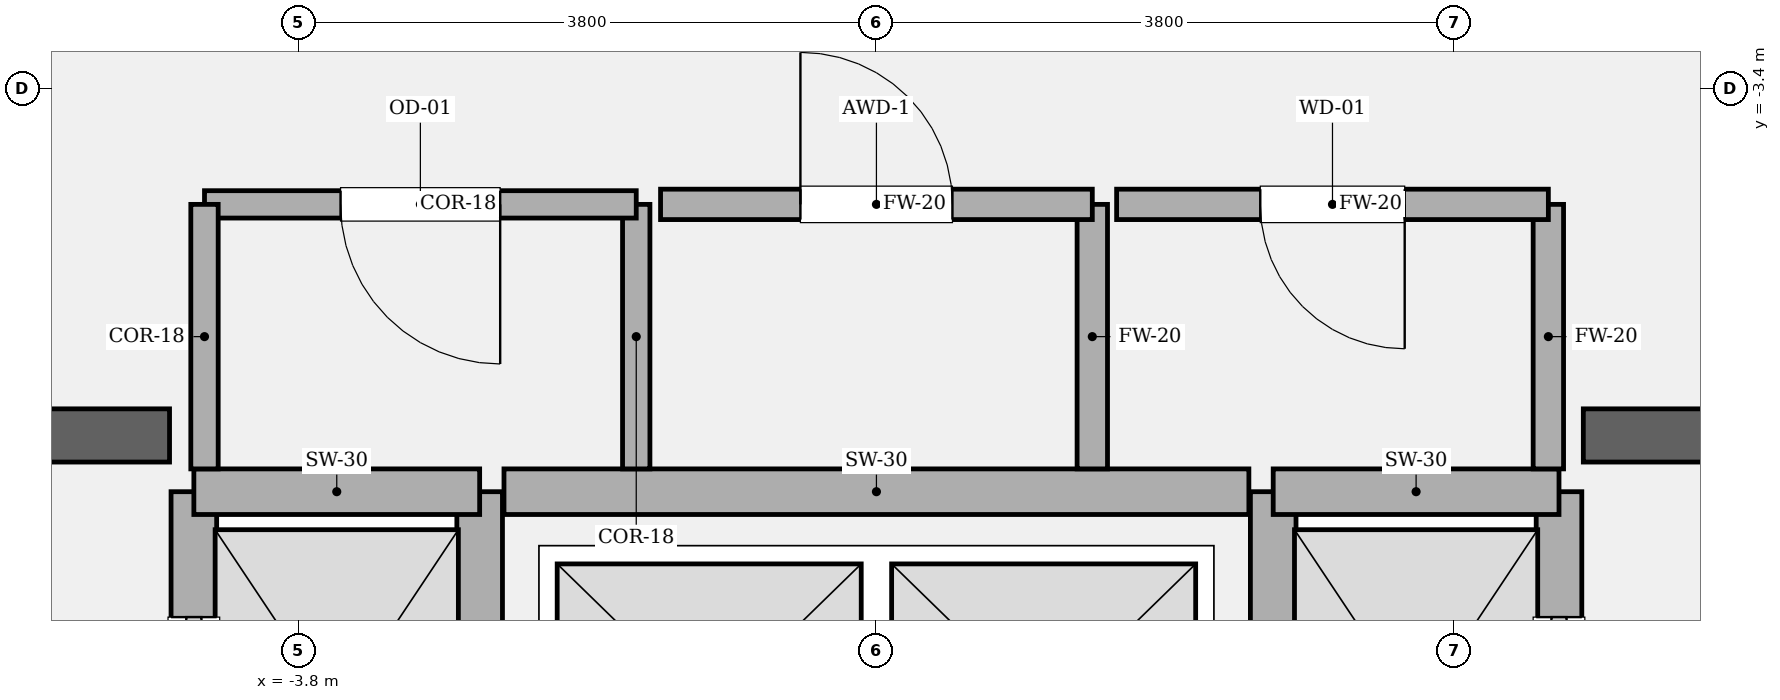
"""IFC4 building model, lengths in metres.
Left out: names, types, materials, properties, quantities, classifications, styles, units other than length and angle.
Written with IfcOpenShell. Run it as: python <this file> out.ifc"""

import sys

from ifc_helpers import new_model, si_unit, direction, frame, frame_2d, origin, place, context, subcontext, project, spatial, rectangle, extrude, element, fill, save


model = new_model("IFC4")
c1 = context("Model", 3, precision=1e-05, world=origin(), true_north=direction((0.0, 1.0)))
c2 = subcontext(c1, "Body", "Model", "MODEL_VIEW")
j1 = project(units=[si_unit("LENGTHUNIT", "METRE"), si_unit("PLANEANGLEUNIT", "RADIAN")], contexts=[c1])
p1 = place(None, origin())
s1 = spatial("IfcSite", under=j1, at=p1, CompositionType="ELEMENT")
p2 = place(p1, origin())
s2 = spatial("IfcBuilding", under=s1, at=p2, CompositionType="ELEMENT")
p3 = place(p2, frame((0.0, 0.0, 334.2)))
s3 = spatial("IfcBuildingStorey", under=s2, at=p3, CompositionType="ELEMENT", Elevation=334.2)
p4 = place(p3, frame((-9.975, -5.68, 0.0), z_axis=(0.0, 0.0, 1.0), x_axis=(1.0, 0.0, 0.0)))
e1 = element("IfcWall", 1, at=p4, inside=s3, PredefinedType="SOLIDWALL", context=c2, shape_type="SweptSolid", body=[
    extrude(rectangle(XDim=5.325, YDim=0.35, at=frame_2d((2.663, 0.0))), origin(), (0.0, 0.0, 1.0), 4.8),
])
p5 = place(p4, frame((1.435, 0.0, 0.0)))
e2 = element("IfcOpeningElement", 2, at=p5, cuts=e1, PredefinedType="OPENING", context=c2, shape_type="SweptSolid", body=[
    extrude(rectangle(XDim=1.18, YDim=2.2, at=frame_2d((0.59, 1.1))), frame((0.0, 0.185, 0.0), z_axis=(0.0, -1.0, 0.0), x_axis=(1.0, 0.0, 0.0)), (0.0, 0.0, 1.0), 0.37),
])
p6 = place(p3, frame((4.65, -5.68, 0.0), z_axis=(0.0, 0.0, 1.0), x_axis=(1.0, 0.0, 0.0)))
e3 = element("IfcWall", 3, at=p6, inside=s3, PredefinedType="SOLIDWALL", context=c2, shape_type="SweptSolid", body=[
    extrude(rectangle(XDim=5.325, YDim=0.35, at=frame_2d((2.663, 0.0))), origin(), (0.0, 0.0, 1.0), 4.8),
])
p7 = place(p6, frame((2.71, 0.0, 0.0)))
e4 = element("IfcOpeningElement", 4, at=p7, cuts=e3, PredefinedType="OPENING", context=c2, shape_type="SweptSolid", body=[
    extrude(rectangle(XDim=1.18, YDim=2.2, at=frame_2d((0.59, 1.1))), frame((0.0, 0.185, 0.0), z_axis=(0.0, -1.0, 0.0), x_axis=(1.0, 0.0, 0.0)), (0.0, 0.0, 1.0), 0.37),
])
p8 = place(p3, frame((-4.49, -8.82, 0.0), z_axis=(0.0, 0.0, 1.0), x_axis=(0.0, 1.0, 0.0)))
e5 = element("IfcWall", 5, at=p8, inside=s3, PredefinedType="SOLIDWALL", context=c2, shape_type="SweptSolid", body=[
    extrude(rectangle(XDim=2.77, YDim=0.3, at=frame_2d((1.385, 0.0))), origin(), (0.0, 0.0, 1.0), 4.54),
])
p9 = place(p8, frame((0.825, 0.0, 0.0)))
e6 = element("IfcOpeningElement", 6, at=p9, cuts=e5, PredefinedType="OPENING", context=c2, shape_type="SweptSolid", body=[
    extrude(rectangle(XDim=1.12, YDim=2.25, at=frame_2d((0.56, 1.125))), frame((0.0, 0.16, 0.0), z_axis=(0.0, -1.0, 0.0), x_axis=(1.0, 0.0, 0.0)), (0.0, 0.0, 1.0), 0.32),
])
p10 = place(p3, frame((-2.61, -8.82, 0.0), z_axis=(0.0, 0.0, 1.0), x_axis=(0.0, 1.0, 0.0)))
e7 = element("IfcWall", 7, at=p10, inside=s3, PredefinedType="SOLIDWALL", context=c2, shape_type="SweptSolid", body=[
    extrude(rectangle(XDim=2.77, YDim=0.3, at=frame_2d((1.385, 0.0))), origin(), (0.0, 0.0, 1.0), 4.54),
])
p11 = place(p3, frame((-4.49, -6.05, 0.0), z_axis=(0.0, 0.0, 1.0), x_axis=(1.0, 0.0, 0.0)))
e8 = element("IfcWall", 8, at=p11, inside=s3, PredefinedType="SOLIDWALL", context=c2, shape_type="SweptSolid", body=[
    extrude(rectangle(XDim=1.88, YDim=0.3, at=frame_2d((0.94, 0.0))), origin(), (0.0, 0.0, 1.0), 4.54),
])
p12 = place(p3, frame((4.49, -8.82, 0.0), z_axis=(0.0, 0.0, 1.0), x_axis=(0.0, 1.0, 0.0)))
e9 = element("IfcWall", 9, at=p12, inside=s3, PredefinedType="SOLIDWALL", context=c2, shape_type="SweptSolid", body=[
    extrude(rectangle(XDim=2.77, YDim=0.3, at=frame_2d((1.385, 0.0))), origin(), (0.0, 0.0, 1.0), 4.54),
])
p13 = place(p12, frame((0.825, 0.0, 0.0)))
e10 = element("IfcOpeningElement", 10, at=p13, cuts=e9, PredefinedType="OPENING", context=c2, shape_type="SweptSolid", body=[
    extrude(rectangle(XDim=1.12, YDim=2.25, at=frame_2d((0.56, 1.125))), frame((0.0, 0.16, 0.0), z_axis=(0.0, -1.0, 0.0), x_axis=(1.0, 0.0, 0.0)), (0.0, 0.0, 1.0), 0.32),
])
p14 = place(p3, frame((2.61, -8.82, 0.0), z_axis=(0.0, 0.0, 1.0), x_axis=(0.0, 1.0, 0.0)))
e11 = element("IfcWall", 11, at=p14, inside=s3, PredefinedType="SOLIDWALL", context=c2, shape_type="SweptSolid", body=[
    extrude(rectangle(XDim=2.77, YDim=0.3, at=frame_2d((1.385, 0.0))), origin(), (0.0, 0.0, 1.0), 4.54),
])
p15 = place(p3, frame((2.61, -6.05, 0.0), z_axis=(0.0, 0.0, 1.0), x_axis=(1.0, 0.0, 0.0)))
e12 = element("IfcWall", 12, at=p15, inside=s3, PredefinedType="SOLIDWALL", context=c2, shape_type="SweptSolid", body=[
    extrude(rectangle(XDim=1.88, YDim=0.3, at=frame_2d((0.94, 0.0))), origin(), (0.0, 0.0, 1.0), 4.54),
])
p16 = place(p3, frame((-2.45, -6.05, 0.0), z_axis=(0.0, 0.0, 1.0), x_axis=(1.0, 0.0, 0.0)))
e13 = element("IfcWall", 13, at=p16, inside=s3, PredefinedType="SOLIDWALL", context=c2, shape_type="SweptSolid", body=[
    extrude(rectangle(XDim=4.9, YDim=0.3, at=frame_2d((2.45, 0.0))), origin(), (0.0, 0.0, 1.0), 4.54),
])
p17 = place(p3, frame((-1.58, -5.9, 0.0), z_axis=(0.0, 0.0, 1.0), x_axis=(0.0, 1.0, 0.0)))
e14 = element("IfcWall", 14, at=p17, inside=s3, PredefinedType="PARTITIONING", context=c2, shape_type="SweptSolid", body=[
    extrude(rectangle(XDim=1.74, YDim=0.18, at=frame_2d((0.87, 0.0))), origin(), (0.0, 0.0, 1.0), 4.54),
])
p18 = place(p3, frame((-1.58, -4.16, 0.0), z_axis=(0.0, 0.0, 1.0), x_axis=(-1.0, 0.0, 0.0)))
e15 = element("IfcWall", 15, at=p18, inside=s3, PredefinedType="PARTITIONING", context=c2, shape_type="SweptSolid", body=[
    extrude(rectangle(XDim=2.84, YDim=0.18, at=frame_2d((1.42, 0.0))), origin(), (0.0, 0.0, 1.0), 4.54),
])
p19 = place(p18, frame((0.895, 0.0, 0.0)))
e16 = element("IfcOpeningElement", 16, at=p19, cuts=e15, PredefinedType="OPENING", context=c2, shape_type="SweptSolid", body=[
    extrude(rectangle(XDim=1.05, YDim=2.2, at=frame_2d((0.525, 1.1))), frame((0.0, 0.1, 0.0), z_axis=(0.0, -1.0, 0.0), x_axis=(1.0, 0.0, 0.0)), (0.0, 0.0, 1.0), 0.2),
])
p20 = place(p3, frame((-4.42, -4.16, 0.0), z_axis=(0.0, 0.0, 1.0), x_axis=(0.0, -1.0, 0.0)))
e17 = element("IfcWall", 17, at=p20, inside=s3, PredefinedType="PARTITIONING", context=c2, shape_type="SweptSolid", body=[
    extrude(rectangle(XDim=1.74, YDim=0.18, at=frame_2d((0.87, 0.0))), origin(), (0.0, 0.0, 1.0), 4.54),
])
p21 = place(p3, frame((1.42, -5.9, 0.0), z_axis=(0.0, 0.0, 1.0), x_axis=(0.0, 1.0, 0.0)))
e18 = element("IfcWall", 18, at=p21, inside=s3, PredefinedType="SOLIDWALL", context=c2, shape_type="SweptSolid", body=[
    extrude(rectangle(XDim=1.74, YDim=0.2, at=frame_2d((0.87, 0.0))), origin(), (0.0, 0.0, 1.0), 4.54),
])
p22 = place(p3, frame((1.42, -4.16, 0.0), z_axis=(0.0, 0.0, 1.0), x_axis=(-1.0, 0.0, 0.0)))
e19 = element("IfcWall", 19, at=p22, inside=s3, PredefinedType="SOLIDWALL", context=c2, shape_type="SweptSolid", body=[
    extrude(rectangle(XDim=2.84, YDim=0.2, at=frame_2d((1.42, 0.0))), origin(), (0.0, 0.0, 1.0), 4.54),
])
p23 = place(p22, frame((0.92, 0.0, 0.0)))
e20 = element("IfcOpeningElement", 20, at=p23, cuts=e19, PredefinedType="OPENING", context=c2, shape_type="SweptSolid", body=[
    extrude(rectangle(XDim=1.0, YDim=2.15, at=frame_2d((0.5, 1.075))), frame((0.0, 0.11, 0.0), z_axis=(0.0, -1.0, 0.0), x_axis=(1.0, 0.0, 0.0)), (0.0, 0.0, 1.0), 0.22),
])
p24 = place(p3, frame((4.42, -5.9, 0.0), z_axis=(0.0, 0.0, 1.0), x_axis=(0.0, 1.0, 0.0)))
e21 = element("IfcWall", 21, at=p24, inside=s3, PredefinedType="SOLIDWALL", context=c2, shape_type="SweptSolid", body=[
    extrude(rectangle(XDim=1.74, YDim=0.2, at=frame_2d((0.87, 0.0))), origin(), (0.0, 0.0, 1.0), 4.54),
])
p25 = place(p3, frame((4.42, -4.16, 0.0), z_axis=(0.0, 0.0, 1.0), x_axis=(-1.0, 0.0, 0.0)))
e22 = element("IfcWall", 22, at=p25, inside=s3, PredefinedType="SOLIDWALL", context=c2, shape_type="SweptSolid", body=[
    extrude(rectangle(XDim=2.84, YDim=0.2, at=frame_2d((1.42, 0.0))), origin(), (0.0, 0.0, 1.0), 4.54),
])
p26 = place(p25, frame((0.945, 0.0, 0.0)))
e23 = element("IfcOpeningElement", 23, at=p26, cuts=e22, PredefinedType="OPENING", context=c2, shape_type="SweptSolid", body=[
    extrude(rectangle(XDim=0.95, YDim=2.15, at=frame_2d((0.475, 1.075))), frame((0.0, 0.11, 0.0), z_axis=(0.0, -1.0, 0.0), x_axis=(1.0, 0.0, 0.0)), (0.0, 0.0, 1.0), 0.22),
])
p27 = place(p9, origin())
e24 = element("IfcDoor", 24, at=p27, inside=s3, OperationType="SLIDING_TO_LEFT", PredefinedType="DOOR", context=c2, shape_type="SweptSolid", body=[
    extrude(rectangle(XDim=1.12, YDim=2.25, at=frame_2d((0.56, 1.125))), frame((0.0, 0.025, 0.0), z_axis=(0.0, -1.0, 0.0), x_axis=(1.0, 0.0, 0.0)), (0.0, 0.0, 1.0), 0.05),
])
fill(e6, e24)
p28 = place(p13, origin())
e25 = element("IfcDoor", 25, at=p28, inside=s3, OperationType="SLIDING_TO_RIGHT", PredefinedType="DOOR", context=c2, shape_type="SweptSolid", body=[
    extrude(rectangle(XDim=1.12, YDim=2.25, at=frame_2d((0.56, 1.125))), frame((0.0, 0.025, 0.0), z_axis=(0.0, -1.0, 0.0), x_axis=(1.0, 0.0, 0.0)), (0.0, 0.0, 1.0), 0.05),
])
fill(e10, e25)
p29 = place(p19, origin())
e26 = element("IfcDoor", 26, at=p29, inside=s3, OperationType="SINGLE_SWING_LEFT", PredefinedType="DOOR", context=c2, shape_type="SweptSolid", body=[
    extrude(rectangle(XDim=1.05, YDim=2.2, at=frame_2d((0.525, 1.1))), frame((0.0, 0.025, 0.0), z_axis=(0.0, -1.0, 0.0), x_axis=(1.0, 0.0, 0.0)), (0.0, 0.0, 1.0), 0.05),
])
fill(e16, e26)
p30 = place(p23, origin())
e27 = element("IfcDoor", 27, at=p30, inside=s3, OperationType="SINGLE_SWING_RIGHT", PredefinedType="DOOR", context=c2, shape_type="SweptSolid", body=[
    extrude(rectangle(XDim=1.0, YDim=2.15, at=frame_2d((0.5, 1.075))), frame((0.0, 0.025, 0.0), z_axis=(0.0, -1.0, 0.0), x_axis=(1.0, 0.0, 0.0)), (0.0, 0.0, 1.0), 0.05),
])
fill(e20, e27)
p31 = place(p26, origin())
e28 = element("IfcDoor", 28, at=p31, inside=s3, OperationType="SINGLE_SWING_LEFT", PredefinedType="DOOR", context=c2, shape_type="SweptSolid", body=[
    extrude(rectangle(XDim=0.95, YDim=2.15, at=frame_2d((0.475, 1.075))), frame((0.0, 0.025, 0.0), z_axis=(0.0, -1.0, 0.0), x_axis=(1.0, 0.0, 0.0)), (0.0, 0.0, 1.0), 0.05),
])
fill(e23, e28)
save(model, sys.argv[1])
